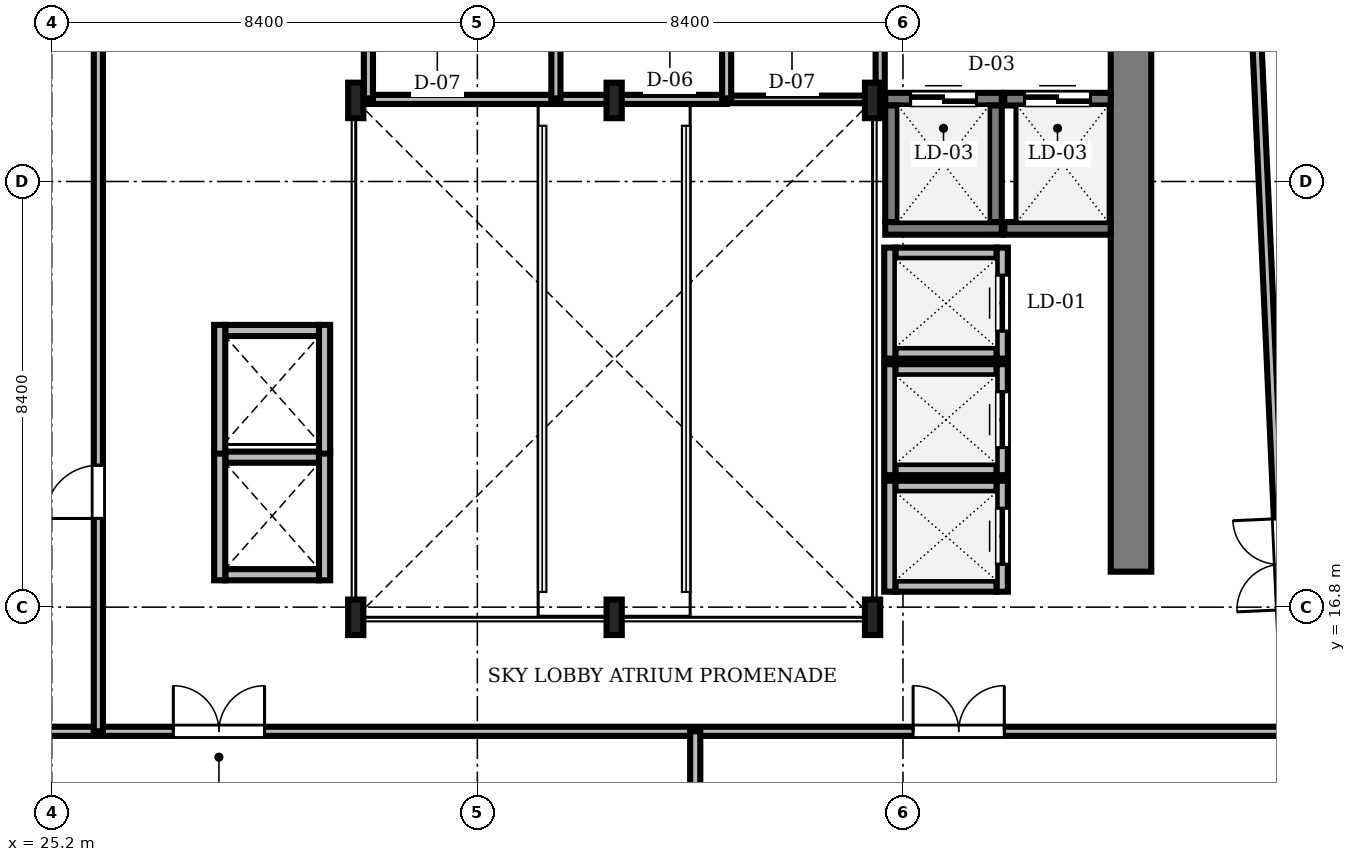
"""IFC4 building model, lengths in metres.
Left out: names, types, materials, properties, quantities, classifications, styles, units other than length and angle.
Written with IfcOpenShell. Run it as: python <this file> out.ifc"""

import sys

from ifc_helpers import new_model, si_unit, direction, frame, frame_2d, origin, origin_2d, place, context, subcontext, project, spatial, rectangle, i_section, extrude, source, transform, mapped, element, fill, save


model = new_model("IFC4")
c1 = context("Model", 3, precision=1e-05, world=origin(), true_north=direction((0.0, 1.0)))
c2 = subcontext(c1, "Body", "Model", "MODEL_VIEW")
j1 = project(units=[si_unit("LENGTHUNIT", "METRE"), si_unit("PLANEANGLEUNIT", "RADIAN")], contexts=[c1])
p1 = place(None, origin())
s1 = spatial("IfcSite", under=j1, at=p1, CompositionType="ELEMENT")
p2 = place(p1, origin())
s2 = spatial("IfcBuilding", under=s1, at=p2, CompositionType="ELEMENT")
p3 = place(p2, frame((0.0, 0.0, 172.2)))
s3 = spatial("IfcBuildingStorey", under=s2, at=p3, CompositionType="ELEMENT", Elevation=172.2)
m1 = source(origin(), c2, "Body", "SweptSolid", [
    extrude(rectangle(XDim=13.15, YDim=0.8, at=frame_2d((6.575, 0.0))), origin(), (0.0, 0.0, 1.0), 4.78),
])
p4 = place(p3, frame((46.5, 17.5, 0.0), z_axis=(0.0, 0.0, 1.0), x_axis=(0.0, 1.0, 0.0)))
e1 = element("IfcWall", 1, at=p4, inside=s3, PredefinedType="SHEAR", context=c2, shape_type="MappedRepresentation", body=[
    mapped(m1, transform((0.0, 0.0, 0.0), scale=1.0)),
])
m2 = source(origin(), c2, "Body", "SweptSolid", [
    extrude(i_section(OverallWidth=0.3, OverallDepth=0.7, WebThickness=0.017, FlangeThickness=0.032, FilletRadius=0.027, at=origin_2d()), origin(), (0.0, 0.0, 1.0), 4.78),
])
for number, where, z_axis, x_axis in (
    (2, (31.2, 16.6, 0.0), (0.0, 0.0, 1.0), (1.0, 0.0, 0.0)),
    (3, (36.3, 16.6, 0.0), (0.0, 0.0, 1.0), (1.0, 0.0, 0.0)),
    (4, (41.4, 16.6, 0.0), (0.0, 0.0, 1.0), (1.0, 0.0, 0.0)),
    (5, (41.4, 26.8, 0.0), (0.0, 0.0, 1.0), (1.0, 0.0, 0.0)),
    (6, (36.3, 26.8, 0.0), (0.0, 0.0, 1.0), (1.0, 0.0, 0.0)),
    (7, (31.2, 26.8, 0.0), (0.0, 0.0, 1.0), (1.0, 0.0, 0.0)),
):
    element("IfcColumn", number, at=place(p3, frame(where, z_axis=z_axis, x_axis=x_axis)), inside=s3, PredefinedType="COLUMN", context=c2, shape_type="MappedRepresentation", body=[
        mapped(m2, transform((0.0, 0.0, 0.0), scale=1.0)),
    ])
m3 = source(origin(), c2, "Body", "SweptSolid", [
    extrude(rectangle(XDim=2.0, YDim=0.22, at=frame_2d((1.0, 0.0))), origin(), (0.0, 0.0, 1.0), 4.78),
])
for number, where, z_axis, x_axis in (
    (8, (41.85, 21.815, 0.0), (0.0, 0.0, 1.0), (1.0, 0.0, 0.0)),
    (9, (41.85, 23.785, 0.0), (0.0, 0.0, 1.0), (1.0, 0.0, 0.0)),
):
    element("IfcWall", number, at=place(p3, frame(where, z_axis=z_axis, x_axis=x_axis)), inside=s3, PredefinedType="SOLIDWALL", context=c2, shape_type="MappedRepresentation", body=[
        mapped(m3, transform((0.0, 0.0, 0.0), scale=1.0)),
    ])
m4 = source(origin(), c2, "Body", "SweptSolid", [
    extrude(rectangle(XDim=2.19, YDim=0.22, at=frame_2d((1.095, 0.0))), origin(), (0.0, 0.0, 1.0), 4.78),
])
p5 = place(p3, frame((41.74, 21.705, 0.0), z_axis=(0.0, 0.0, 1.0), x_axis=(0.0, 1.0, 0.0)))
e10 = element("IfcWall", 10, at=p5, inside=s3, PredefinedType="SOLIDWALL", context=c2, shape_type="MappedRepresentation", body=[
    mapped(m4, transform((0.0, 0.0, 0.0), scale=1.0)),
])
p6 = place(p3, frame((43.96, 21.705, 0.0), z_axis=(0.0, 0.0, 1.0), x_axis=(0.0, 1.0, 0.0)))
e11 = element("IfcWall", 11, at=p6, inside=s3, PredefinedType="SOLIDWALL", context=c2, shape_type="MappedRepresentation", body=[
    mapped(m4, transform((0.0, 0.0, 0.0), scale=1.0)),
])
m5 = source(origin(), c2, "Body", "SweptSolid", [
    extrude(rectangle(XDim=1.1, YDim=2.2, at=frame_2d((0.55, 1.1))), frame((0.0, 0.12, 0.0), z_axis=(0.0, -1.0, 0.0), x_axis=(1.0, 0.0, 0.0)), (0.0, 0.0, 1.0), 0.24),
])
p7 = place(p6, frame((0.545, 0.0, 0.0)))
e12 = element("IfcOpeningElement", 12, at=p7, cuts=e11, PredefinedType="OPENING", context=c2, shape_type="MappedRepresentation", body=[
    mapped(m5, transform((0.0, 0.0, 0.0), scale=1.0)),
])
for number, where, z_axis, x_axis in (
    (13, (41.85, 19.515, 0.0), (0.0, 0.0, 1.0), (1.0, 0.0, 0.0)),
    (14, (41.85, 21.485, 0.0), (0.0, 0.0, 1.0), (1.0, 0.0, 0.0)),
):
    element("IfcWall", number, at=place(p3, frame(where, z_axis=z_axis, x_axis=x_axis)), inside=s3, PredefinedType="SOLIDWALL", context=c2, shape_type="MappedRepresentation", body=[
        mapped(m3, transform((0.0, 0.0, 0.0), scale=1.0)),
    ])
p8 = place(p3, frame((41.74, 19.405, 0.0), z_axis=(0.0, 0.0, 1.0), x_axis=(0.0, 1.0, 0.0)))
e15 = element("IfcWall", 15, at=p8, inside=s3, PredefinedType="SOLIDWALL", context=c2, shape_type="MappedRepresentation", body=[
    mapped(m4, transform((0.0, 0.0, 0.0), scale=1.0)),
])
p9 = place(p3, frame((43.96, 19.405, 0.0), z_axis=(0.0, 0.0, 1.0), x_axis=(0.0, 1.0, 0.0)))
e16 = element("IfcWall", 16, at=p9, inside=s3, PredefinedType="SOLIDWALL", context=c2, shape_type="MappedRepresentation", body=[
    mapped(m4, transform((0.0, 0.0, 0.0), scale=1.0)),
])
p10 = place(p9, frame((0.545, 0.0, 0.0)))
e17 = element("IfcOpeningElement", 17, at=p10, cuts=e16, PredefinedType="OPENING", context=c2, shape_type="MappedRepresentation", body=[
    mapped(m5, transform((0.0, 0.0, 0.0), scale=1.0)),
])
for number, where, z_axis, x_axis in (
    (18, (41.85, 17.215, 0.0), (0.0, 0.0, 1.0), (1.0, 0.0, 0.0)),
    (19, (41.85, 19.185, 0.0), (0.0, 0.0, 1.0), (1.0, 0.0, 0.0)),
):
    element("IfcWall", number, at=place(p3, frame(where, z_axis=z_axis, x_axis=x_axis)), inside=s3, PredefinedType="SOLIDWALL", context=c2, shape_type="MappedRepresentation", body=[
        mapped(m3, transform((0.0, 0.0, 0.0), scale=1.0)),
    ])
p11 = place(p3, frame((41.74, 17.105, 0.0), z_axis=(0.0, 0.0, 1.0), x_axis=(0.0, 1.0, 0.0)))
e20 = element("IfcWall", 20, at=p11, inside=s3, PredefinedType="SOLIDWALL", context=c2, shape_type="MappedRepresentation", body=[
    mapped(m4, transform((0.0, 0.0, 0.0), scale=1.0)),
])
p12 = place(p3, frame((43.96, 17.105, 0.0), z_axis=(0.0, 0.0, 1.0), x_axis=(0.0, 1.0, 0.0)))
e21 = element("IfcWall", 21, at=p12, inside=s3, PredefinedType="SOLIDWALL", context=c2, shape_type="MappedRepresentation", body=[
    mapped(m4, transform((0.0, 0.0, 0.0), scale=1.0)),
])
p13 = place(p12, frame((0.545, 0.0, 0.0)))
e22 = element("IfcOpeningElement", 22, at=p13, cuts=e21, PredefinedType="OPENING", context=c2, shape_type="MappedRepresentation", body=[
    mapped(m5, transform((0.0, 0.0, 0.0), scale=1.0)),
])
m6 = source(origin(), c2, "Body", "SweptSolid", [
    extrude(rectangle(XDim=1.85, YDim=0.22, at=frame_2d((0.925, 0.0))), origin(), (0.0, 0.0, 1.0), 4.222),
])
p14 = place(p3, frame((28.625, 17.44, 0.0), z_axis=(0.0, 0.0, 1.0), x_axis=(1.0, 0.0, 0.0)))
e23 = element("IfcWall", 23, at=p14, inside=s3, PredefinedType="SOLIDWALL", context=c2, shape_type="MappedRepresentation", body=[
    mapped(m6, transform((0.0, 0.0, 0.0), scale=1.0)),
])
m7 = source(origin(), c2, "Body", "SweptSolid", [
    extrude(rectangle(XDim=1.85, YDim=0.22, at=frame_2d((0.925, 0.0))), origin(), (0.0, 0.0, 1.0), 4.78),
])
p15 = place(p3, frame((28.625, 19.76, 0.0), z_axis=(0.0, 0.0, 1.0), x_axis=(1.0, 0.0, 0.0)))
e24 = element("IfcWall", 24, at=p15, inside=s3, PredefinedType="SOLIDWALL", context=c2, shape_type="MappedRepresentation", body=[
    mapped(m7, transform((0.0, 0.0, 0.0), scale=1.0)),
])
m8 = source(origin(), c2, "Body", "SweptSolid", [
    extrude(rectangle(XDim=2.54, YDim=0.22, at=frame_2d((1.27, 0.0))), origin(), (0.0, 0.0, 1.0), 4.222),
])
p16 = place(p3, frame((28.515, 17.33, 0.0), z_axis=(0.0, 0.0, 1.0), x_axis=(0.0, 1.0, 0.0)))
e25 = element("IfcWall", 25, at=p16, inside=s3, PredefinedType="SOLIDWALL", context=c2, shape_type="MappedRepresentation", body=[
    mapped(m8, transform((0.0, 0.0, 0.0), scale=1.0)),
])
m9 = source(origin(), c2, "Body", "SweptSolid", [
    extrude(rectangle(XDim=2.54, YDim=0.22, at=frame_2d((1.27, 0.0))), origin(), (0.0, 0.0, 1.0), 4.78),
])
p17 = place(p3, frame((30.585, 17.33, 0.0), z_axis=(0.0, 0.0, 1.0), x_axis=(0.0, 1.0, 0.0)))
e26 = element("IfcWall", 26, at=p17, inside=s3, PredefinedType="SOLIDWALL", context=c2, shape_type="MappedRepresentation", body=[
    mapped(m9, transform((0.0, 0.0, 0.0), scale=1.0)),
])
p18 = place(p3, frame((28.625, 22.26, 0.0), z_axis=(0.0, 0.0, 1.0), x_axis=(1.0, 0.0, 0.0)))
e27 = element("IfcWall", 27, at=p18, inside=s3, PredefinedType="SOLIDWALL", context=c2, shape_type="MappedRepresentation", body=[
    mapped(m7, transform((0.0, 0.0, 0.0), scale=1.0)),
])
for number, where, z_axis, x_axis in (
    (28, (28.515, 19.83, 0.0), (0.0, 0.0, 1.0), (0.0, 1.0, 0.0)),
    (29, (30.585, 19.83, 0.0), (0.0, 0.0, 1.0), (0.0, 1.0, 0.0)),
):
    element("IfcWall", number, at=place(p3, frame(where, z_axis=z_axis, x_axis=x_axis)), inside=s3, PredefinedType="SOLIDWALL", context=c2, shape_type="MappedRepresentation", body=[
        mapped(m9, transform((0.0, 0.0, 0.0), scale=1.0)),
    ])
m10 = source(origin(), c2, "Body", "SweptSolid", [
    extrude(rectangle(XDim=2.3, YDim=0.25, at=frame_2d((1.15, 0.0))), origin(), (0.0, 0.0, 1.0), 4.78),
])
p19 = place(p3, frame((41.65, 24.275, 0.0), z_axis=(0.0, 0.0, 1.0), x_axis=(1.0, 0.0, 0.0)))
e30 = element("IfcWall", 30, at=p19, inside=s3, PredefinedType="SOLIDWALL", context=c2, shape_type="MappedRepresentation", body=[
    mapped(m10, transform((0.0, 0.0, 0.0), scale=1.0)),
])
p20 = place(p3, frame((41.65, 26.825, 0.0), z_axis=(0.0, 0.0, 1.0), x_axis=(1.0, 0.0, 0.0)))
e31 = element("IfcWall", 31, at=p20, inside=s3, PredefinedType="SOLIDWALL", context=c2, shape_type="MappedRepresentation", body=[
    mapped(m10, transform((0.0, 0.0, 0.0), scale=1.0)),
])
m11 = source(origin(), c2, "Body", "SweptSolid", [
    extrude(rectangle(XDim=1.3, YDim=2.3, at=frame_2d((0.65, 1.15))), frame((0.0, 0.135, 0.0), z_axis=(0.0, -1.0, 0.0), x_axis=(1.0, 0.0, 0.0)), (0.0, 0.0, 1.0), 0.27),
])
p21 = place(p20, frame((0.5, 0.0, 0.0)))
e32 = element("IfcOpeningElement", 32, at=p21, cuts=e31, PredefinedType="OPENING", context=c2, shape_type="MappedRepresentation", body=[
    mapped(m11, transform((0.0, 0.0, 0.0), scale=1.0)),
])
for number, where, z_axis, x_axis in (
    (33, (41.775, 24.4, 0.0), (0.0, 0.0, 1.0), (0.0, 1.0, 0.0)),
    (34, (43.825, 24.4, 0.0), (0.0, 0.0, 1.0), (0.0, 1.0, 0.0)),
):
    element("IfcWall", number, at=place(p3, frame(where, z_axis=z_axis, x_axis=x_axis)), inside=s3, PredefinedType="SOLIDWALL", context=c2, shape_type="MappedRepresentation", body=[
        mapped(m10, transform((0.0, 0.0, 0.0), scale=1.0)),
    ])
m12 = source(origin(), c2, "Body", "SweptSolid", [
    extrude(rectangle(XDim=2.1, YDim=0.25, at=frame_2d((1.05, 0.0))), origin(), (0.0, 0.0, 1.0), 4.78),
])
p22 = place(p3, frame((44.0, 24.275, 0.0), z_axis=(0.0, 0.0, 1.0), x_axis=(1.0, 0.0, 0.0)))
e35 = element("IfcWall", 35, at=p22, inside=s3, PredefinedType="SOLIDWALL", context=c2, shape_type="MappedRepresentation", body=[
    mapped(m12, transform((0.0, 0.0, 0.0), scale=1.0)),
])
p23 = place(p3, frame((44.0, 26.825, 0.0), z_axis=(0.0, 0.0, 1.0), x_axis=(1.0, 0.0, 0.0)))
e36 = element("IfcWall", 36, at=p23, inside=s3, PredefinedType="SOLIDWALL", context=c2, shape_type="MappedRepresentation", body=[
    mapped(m12, transform((0.0, 0.0, 0.0), scale=1.0)),
])
p24 = place(p23, frame((0.4, 0.0, 0.0)))
e37 = element("IfcOpeningElement", 37, at=p24, cuts=e36, PredefinedType="OPENING", context=c2, shape_type="MappedRepresentation", body=[
    mapped(m11, transform((0.0, 0.0, 0.0), scale=1.0)),
])
m13 = source(origin(), c2, "Body", "SweptSolid", [
    extrude(rectangle(XDim=46.1, YDim=0.18, at=frame_2d((23.05, 0.0))), origin(), (0.0, 0.0, 1.0), 4.022),
])
p25 = place(p3, frame((11.45, 14.35, 0.0), z_axis=(0.0, 0.0, 1.0), x_axis=(1.0, 0.0, 0.0)))
e38 = element("IfcWall", 38, at=p25, inside=s3, PredefinedType="PARTITIONING", context=c2, shape_type="MappedRepresentation", body=[
    mapped(m13, transform((0.0, 0.0, 0.0), scale=1.0)),
])
m14 = source(origin(), c2, "Body", "SweptSolid", [
    extrude(rectangle(XDim=1.8, YDim=2.4, at=frame_2d((0.9, 1.2))), frame((0.0, 0.1, 0.0), z_axis=(0.0, -1.0, 0.0), x_axis=(1.0, 0.0, 0.0)), (0.0, 0.0, 1.0), 0.2),
])
p26 = place(p25, frame((16.15, 0.0, 0.0)))
e39 = element("IfcOpeningElement", 39, at=p26, cuts=e38, PredefinedType="OPENING", context=c2, shape_type="MappedRepresentation", body=[
    mapped(m14, transform((0.0, 0.0, 0.0), scale=1.0)),
])
p27 = place(p25, frame((30.75, 0.0, 0.0)))
e40 = element("IfcOpeningElement", 40, at=p27, cuts=e38, PredefinedType="OPENING", context=c2, shape_type="MappedRepresentation", body=[
    mapped(m14, transform((0.0, 0.0, 0.0), scale=1.0)),
])
m15 = source(origin(), c2, "Body", "SweptSolid", [
    extrude(rectangle(XDim=26.557, YDim=0.18, at=frame_2d((13.278, 0.0))), origin(), (0.0, 0.0, 1.0), 4.222),
])
p28 = place(p3, frame((49.6, 14.35, 0.0), z_axis=(0.0, 0.0, 1.0), x_axis=(-0.045193318299, 0.998978260014, 0.0)))
e41 = element("IfcWall", 41, at=p28, inside=s3, PredefinedType="PARTITIONING", context=c2, shape_type="MappedRepresentation", body=[
    mapped(m15, transform((0.0, 0.0, 0.0), scale=1.0)),
])
p29 = place(p28, frame((2.4, 0.0, 0.0)))
e42 = element("IfcOpeningElement", 42, at=p29, cuts=e41, PredefinedType="OPENING", context=c2, shape_type="MappedRepresentation", body=[
    mapped(m14, transform((0.0, 0.0, 0.0), scale=1.0)),
])
m16 = source(origin(), c2, "Body", "SweptSolid", [
    extrude(rectangle(XDim=1.05, YDim=2.2, at=frame_2d((0.525, 1.1))), frame((0.0, 0.1, 0.0), z_axis=(0.0, -1.0, 0.0), x_axis=(1.0, 0.0, 0.0)), (0.0, 0.0, 1.0), 0.2),
])
p30 = place(p28, frame((19.2, 0.0, 0.0)))
e43 = element("IfcOpeningElement", 43, at=p30, cuts=e41, PredefinedType="OPENING", context=c2, shape_type="MappedRepresentation", body=[
    mapped(m16, transform((0.0, 0.0, 0.0), scale=1.0)),
])
m17 = source(origin(), c2, "Body", "SweptSolid", [
    extrude(rectangle(XDim=13.9, YDim=0.18, at=frame_2d((6.95, 0.0))), origin(), (0.0, 0.0, 1.0), 4.222),
])
p31 = place(p3, frame((26.12, 14.35, 0.0), z_axis=(0.0, 0.0, 1.0), x_axis=(0.0, 1.0, 0.0)))
e44 = element("IfcWall", 44, at=p31, inside=s3, PredefinedType="PARTITIONING", context=c2, shape_type="MappedRepresentation", body=[
    mapped(m17, transform((0.0, 0.0, 0.0), scale=1.0)),
])
p32 = place(p31, frame((4.2, 0.0, 0.0)))
e45 = element("IfcOpeningElement", 45, at=p32, cuts=e44, PredefinedType="OPENING", context=c2, shape_type="MappedRepresentation", body=[
    mapped(m16, transform((0.0, 0.0, 0.0), scale=1.0)),
])
m18 = source(origin(), c2, "Body", "SweptSolid", [
    extrude(rectangle(XDim=12.2, YDim=0.2, at=frame_2d((6.1, 0.0))), origin(), (0.0, 0.0, 1.0), 4.022),
])
p33 = place(p3, frame((37.9, 2.15, 0.0), z_axis=(0.0, 0.0, 1.0), x_axis=(0.0, 1.0, 0.0)))
e46 = element("IfcWall", 46, at=p33, inside=s3, PredefinedType="PARTITIONING", context=c2, shape_type="MappedRepresentation", body=[
    mapped(m18, transform((0.0, 0.0, 0.0), scale=1.0)),
])
m19 = source(origin(), c2, "Body", "SweptSolid", [
    extrude(rectangle(XDim=3.7, YDim=0.18, at=frame_2d((1.85, 0.0))), origin(), (0.0, 0.0, 1.0), 4.322),
])
p34 = place(p3, frame((31.45, 26.82, 0.0), z_axis=(0.0, 0.0, 1.0), x_axis=(1.0, 0.0, 0.0)))
e47 = element("IfcWall", 47, at=p34, inside=s3, PredefinedType="PARTITIONING", context=c2, shape_type="MappedRepresentation", body=[
    mapped(m19, transform((0.0, 0.0, 0.0), scale=1.0)),
])
m20 = source(origin(), c2, "Body", "SweptSolid", [
    extrude(rectangle(XDim=3.37, YDim=0.18, at=frame_2d((1.685, 0.0))), origin(), (0.0, 0.0, 1.0), 4.322),
])
p35 = place(p3, frame((35.15, 26.82, 0.0), z_axis=(0.0, 0.0, 1.0), x_axis=(1.0, 0.0, 0.0)))
e48 = element("IfcWall", 48, at=p35, inside=s3, PredefinedType="PARTITIONING", context=c2, shape_type="MappedRepresentation", body=[
    mapped(m20, transform((0.0, 0.0, 0.0), scale=1.0)),
])
m21 = source(origin(), c2, "Body", "SweptSolid", [
    extrude(rectangle(XDim=3.0, YDim=0.15, at=frame_2d((1.5, 0.0))), origin(), (0.0, 0.0, 1.0), 4.222),
])
p36 = place(p3, frame((38.52, 26.82, 0.0), z_axis=(0.0, 0.0, 1.0), x_axis=(1.0, 0.0, 0.0)))
e49 = element("IfcWall", 49, at=p36, inside=s3, PredefinedType="PARTITIONING", context=c2, shape_type="MappedRepresentation", body=[
    mapped(m21, transform((0.0, 0.0, 0.0), scale=1.0)),
])
m22 = source(origin(), c2, "Body", "SweptSolid", [
    extrude(rectangle(XDim=2.35, YDim=0.18, at=frame_2d((1.175, 0.0))), origin(), (0.0, 0.0, 1.0), 4.222),
])
p37 = place(p3, frame((41.55, 26.8, 0.0), z_axis=(0.0, 0.0, 1.0), x_axis=(0.0, 1.0, 0.0)))
e50 = element("IfcWall", 50, at=p37, inside=s3, PredefinedType="PARTITIONING", context=c2, shape_type="MappedRepresentation", body=[
    mapped(m22, transform((0.0, 0.0, 0.0), scale=1.0)),
])
m23 = source(origin(), c2, "Body", "SweptSolid", [
    extrude(rectangle(XDim=1.66, YDim=0.18, at=frame_2d((0.83, 0.0))), origin(), (0.0, 0.0, 1.0), 4.322),
])
for number, where, z_axis, x_axis in (
    (51, (35.15, 26.82, 0.0), (0.0, 0.0, 1.0), (0.0, 1.0, 0.0)),
    (52, (38.52, 26.82, 0.0), (0.0, 0.0, 1.0), (0.0, 1.0, 0.0)),
):
    element("IfcWall", number, at=place(p3, frame(where, z_axis=z_axis, x_axis=x_axis)), inside=s3, PredefinedType="PARTITIONING", context=c2, shape_type="MappedRepresentation", body=[
        mapped(m23, transform((0.0, 0.0, 0.0), scale=1.0)),
    ])
m24 = source(origin(), c2, "Body", "SweptSolid", [
    extrude(rectangle(XDim=1.6, YDim=0.18, at=frame_2d((0.8, 0.0))), origin(), (0.0, 0.0, 1.0), 4.322),
])
p38 = place(p3, frame((31.45, 26.82, 0.0), z_axis=(0.0, 0.0, 1.0), x_axis=(0.0, 1.0, 0.0)))
e53 = element("IfcWall", 53, at=p38, inside=s3, PredefinedType="PARTITIONING", context=c2, shape_type="MappedRepresentation", body=[
    mapped(m24, transform((0.0, 0.0, 0.0), scale=1.0)),
])
m25 = source(origin(), c2, "Body", "SweptSolid", [
    extrude(rectangle(XDim=1.1, YDim=2.2, at=frame_2d((0.55, 1.1))), frame((0.0, 0.025, 0.0), z_axis=(0.0, -1.0, 0.0), x_axis=(1.0, 0.0, 0.0)), (0.0, 0.0, 1.0), 0.05),
])
p39 = place(p7, origin())
e54 = element("IfcDoor", 54, at=p39, inside=s3, OperationType="DOUBLE_DOOR_SLIDING", PredefinedType="DOOR", context=c2, shape_type="MappedRepresentation", body=[
    mapped(m25, transform((0.0, 0.0, 0.0), scale=1.0)),
])
fill(e12, e54)
p40 = place(p10, origin())
e55 = element("IfcDoor", 55, at=p40, inside=s3, OperationType="DOUBLE_DOOR_SLIDING", PredefinedType="DOOR", context=c2, shape_type="MappedRepresentation", body=[
    mapped(m25, transform((0.0, 0.0, 0.0), scale=1.0)),
])
fill(e17, e55)
p41 = place(p13, origin())
e56 = element("IfcDoor", 56, at=p41, inside=s3, OperationType="DOUBLE_DOOR_SLIDING", PredefinedType="DOOR", context=c2, shape_type="MappedRepresentation", body=[
    mapped(m25, transform((0.0, 0.0, 0.0), scale=1.0)),
])
fill(e22, e56)
m26 = source(origin(), c2, "Body", "SweptSolid", [
    extrude(rectangle(XDim=1.3, YDim=2.3, at=frame_2d((0.65, 1.15))), frame((0.0, 0.025, 0.0), z_axis=(0.0, -1.0, 0.0), x_axis=(1.0, 0.0, 0.0)), (0.0, 0.0, 1.0), 0.05),
])
p42 = place(p21, origin())
e57 = element("IfcDoor", 57, at=p42, inside=s3, OperationType="DOUBLE_DOOR_SLIDING", PredefinedType="DOOR", context=c2, shape_type="MappedRepresentation", body=[
    mapped(m26, transform((0.0, 0.0, 0.0), scale=1.0)),
])
fill(e32, e57)
p43 = place(p24, origin())
e58 = element("IfcDoor", 58, at=p43, inside=s3, OperationType="DOUBLE_DOOR_SLIDING", PredefinedType="DOOR", context=c2, shape_type="MappedRepresentation", body=[
    mapped(m26, transform((0.0, 0.0, 0.0), scale=1.0)),
])
fill(e37, e58)
m27 = source(origin(), c2, "Body", "SweptSolid", [
    extrude(rectangle(XDim=1.8, YDim=2.4, at=frame_2d((0.9, 1.2))), frame((0.0, 0.025, 0.0), z_axis=(0.0, -1.0, 0.0), x_axis=(1.0, 0.0, 0.0)), (0.0, 0.0, 1.0), 0.05),
])
p44 = place(p26, origin())
e59 = element("IfcDoor", 59, at=p44, inside=s3, OperationType="DOUBLE_DOOR_SINGLE_SWING", PredefinedType="DOOR", context=c2, shape_type="MappedRepresentation", body=[
    mapped(m27, transform((0.0, 0.0, 0.0), scale=1.0)),
])
fill(e39, e59)
p45 = place(p27, origin())
e60 = element("IfcDoor", 60, at=p45, inside=s3, OperationType="DOUBLE_DOOR_SINGLE_SWING", PredefinedType="DOOR", context=c2, shape_type="MappedRepresentation", body=[
    mapped(m27, transform((0.0, 0.0, 0.0), scale=1.0)),
])
fill(e40, e60)
m28 = source(origin(), c2, "Body", "SweptSolid", [
    extrude(rectangle(XDim=1.05, YDim=2.2, at=frame_2d((0.525, 1.1))), frame((0.0, 0.025, 0.0), z_axis=(0.0, -1.0, 0.0), x_axis=(1.0, 0.0, 0.0)), (0.0, 0.0, 1.0), 0.05),
])
p46 = place(p32, origin())
e61 = element("IfcDoor", 61, at=p46, inside=s3, OperationType="SINGLE_SWING_LEFT", PredefinedType="DOOR", context=c2, shape_type="MappedRepresentation", body=[
    mapped(m28, transform((0.0, 0.0, 0.0), scale=1.0)),
])
fill(e45, e61)
save(model, sys.argv[1])
